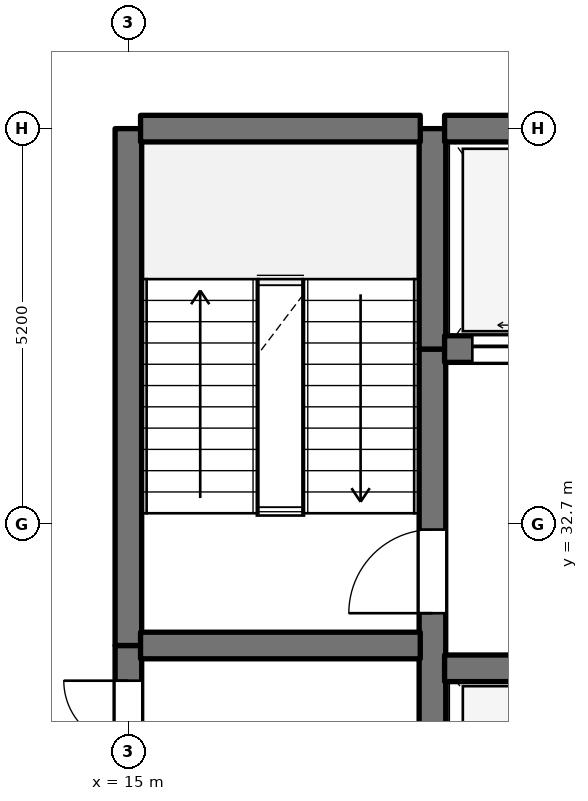
"""IFC4 building model, lengths in metres.
Left out: names, types, materials, properties, quantities, classifications, styles, units other than length and angle.
Written with IfcOpenShell. Run it as: python <this file> out.ifc"""

import sys

from ifc_helpers import new_model, si_unit, direction, frame, frame_2d, origin, place, context, subcontext, project, spatial, rectangle, extrude, element, fill, save


model = new_model("IFC4")
c1 = context("Model", 3, precision=1e-05, world=origin(), true_north=direction((0.0, 1.0)))
c2 = subcontext(c1, "Body", "Model", "MODEL_VIEW")
j1 = project(units=[si_unit("LENGTHUNIT", "METRE"), si_unit("PLANEANGLEUNIT", "RADIAN")], contexts=[c1])
p1 = place(None, origin())
s1 = spatial("IfcSite", under=j1, at=p1, CompositionType="ELEMENT")
p2 = place(p1, origin())
s2 = spatial("IfcBuilding", under=s1, at=p2, CompositionType="ELEMENT")
p3 = place(p2, frame((0.0, 0.0, 164.6)))
s3 = spatial("IfcBuildingStorey", under=s2, at=p3, CompositionType="ELEMENT", Elevation=164.6)
p4 = place(p3, frame((15.0, 29.5, 0.0), z_axis=(0.0, 0.0, 1.0), x_axis=(0.0, 1.0, 0.0)))
e1 = element("IfcWall", 1, at=p4, inside=s3, PredefinedType="SHEAR", context=c2, shape_type="SweptSolid", body=[
    extrude(rectangle(XDim=1.6, YDim=0.35, at=frame_2d((0.8, 0.0))), origin(), (0.0, 0.0, 1.0), 4.19),
])
p5 = place(p4, frame((0.287, 0.0, 0.0)))
e2 = element("IfcOpeningElement", 2, at=p5, cuts=e1, PredefinedType="OPENING", context=c2, shape_type="SweptSolid", body=[
    extrude(rectangle(XDim=0.85, YDim=2.1, at=frame_2d((0.425, 1.05))), frame((0.0, 0.185, 0.0), z_axis=(0.0, -1.0, 0.0), x_axis=(1.0, 0.0, 0.0)), (0.0, 0.0, 1.0), 0.37),
])
p6 = place(p3, frame((15.0, 31.1, 0.0), z_axis=(0.0, 0.0, 1.0), x_axis=(0.0, 1.0, 0.0)))
e3 = element("IfcWall", 3, at=p6, inside=s3, PredefinedType="SHEAR", context=c2, shape_type="SweptSolid", body=[
    extrude(rectangle(XDim=6.8, YDim=0.35, at=frame_2d((3.4, 0.0))), origin(), (0.0, 0.0, 1.0), 4.19),
])
p7 = place(p3, frame((19.0, 29.5, 0.0), z_axis=(0.0, 0.0, 1.0), x_axis=(0.0, 1.0, 0.0)))
e4 = element("IfcWall", 4, at=p7, inside=s3, PredefinedType="SHEAR", context=c2, shape_type="SweptSolid", body=[
    extrude(rectangle(XDim=5.5, YDim=0.35, at=frame_2d((2.75, 0.0))), origin(), (0.0, 0.0, 1.0), 4.19),
])
p8 = place(p7, frame((2.025, 0.0, 0.0)))
e5 = element("IfcOpeningElement", 5, at=p8, cuts=e4, PredefinedType="OPENING", context=c2, shape_type="SweptSolid", body=[
    extrude(rectangle(XDim=1.1, YDim=2.15, at=frame_2d((0.55, 1.075))), frame((0.0, 0.185, 0.0), z_axis=(0.0, -1.0, 0.0), x_axis=(1.0, 0.0, 0.0)), (0.0, 0.0, 1.0), 0.37),
])
p9 = place(p3, frame((19.0, 35.0, 0.0), z_axis=(0.0, 0.0, 1.0), x_axis=(0.0, 1.0, 0.0)))
e6 = element("IfcWall", 6, at=p9, inside=s3, PredefinedType="SHEAR", context=c2, shape_type="SweptSolid", body=[
    extrude(rectangle(XDim=2.9, YDim=0.35, at=frame_2d((1.45, 0.0))), origin(), (0.0, 0.0, 1.0), 4.19),
])
p10 = place(p3, frame((19.16, 30.8, 0.0), z_axis=(0.0, 0.0, 1.0), x_axis=(1.0, 0.0, 0.0)))
e7 = element("IfcWall", 7, at=p10, inside=s3, PredefinedType="SHEAR", context=c2, shape_type="SweptSolid", body=[
    extrude(rectangle(XDim=4.48, YDim=0.35, at=frame_2d((2.24, 0.0))), origin(), (0.0, 0.0, 1.0), 4.19),
])
p11 = place(p3, frame((15.16, 31.1, 0.0), z_axis=(0.0, 0.0, 1.0), x_axis=(1.0, 0.0, 0.0)))
e8 = element("IfcWall", 8, at=p11, inside=s3, PredefinedType="SHEAR", context=c2, shape_type="SweptSolid", body=[
    extrude(rectangle(XDim=3.68, YDim=0.35, at=frame_2d((1.84, 0.0))), origin(), (0.0, 0.0, 1.0), 4.19),
])
p12 = place(p3, frame((19.16, 35.0, 0.0), z_axis=(0.0, 0.0, 1.0), x_axis=(1.0, 0.0, 0.0)))
e9 = element("IfcWall", 9, at=p12, inside=s3, PredefinedType="SHEAR", context=c2, shape_type="SweptSolid", body=[
    extrude(rectangle(XDim=4.48, YDim=0.35, at=frame_2d((2.24, 0.0))), origin(), (0.0, 0.0, 1.0), 4.19),
])
p13 = place(p12, frame((0.365, 0.0, 0.0)))
e10 = element("IfcOpeningElement", 10, at=p13, cuts=e9, PredefinedType="OPENING", context=c2, shape_type="SweptSolid", body=[
    extrude(rectangle(XDim=1.35, YDim=2.2, at=frame_2d((0.675, 1.1))), frame((0.0, 0.185, 0.0), z_axis=(0.0, -1.0, 0.0), x_axis=(1.0, 0.0, 0.0)), (0.0, 0.0, 1.0), 0.37),
])
p14 = place(p12, frame((2.765, 0.0, 0.0)))
e11 = element("IfcOpeningElement", 11, at=p14, cuts=e9, PredefinedType="OPENING", context=c2, shape_type="SweptSolid", body=[
    extrude(rectangle(XDim=1.35, YDim=2.2, at=frame_2d((0.675, 1.1))), frame((0.0, 0.185, 0.0), z_axis=(0.0, -1.0, 0.0), x_axis=(1.0, 0.0, 0.0)), (0.0, 0.0, 1.0), 0.37),
])
p15 = place(p3, frame((15.16, 37.9, 0.0), z_axis=(0.0, 0.0, 1.0), x_axis=(1.0, 0.0, 0.0)))
e12 = element("IfcWall", 12, at=p15, inside=s3, PredefinedType="SHEAR", context=c2, shape_type="SweptSolid", body=[
    extrude(rectangle(XDim=3.68, YDim=0.35, at=frame_2d((1.84, 0.0))), origin(), (0.0, 0.0, 1.0), 4.19),
])
p16 = place(p3, frame((19.16, 37.9, 0.0), z_axis=(0.0, 0.0, 1.0), x_axis=(1.0, 0.0, 0.0)))
e13 = element("IfcWall", 13, at=p16, inside=s3, PredefinedType="SHEAR", context=c2, shape_type="SweptSolid", body=[
    extrude(rectangle(XDim=4.48, YDim=0.35, at=frame_2d((2.24, 0.0))), origin(), (0.0, 0.0, 1.0), 4.19),
])
p17 = place(p5, origin())
e14 = element("IfcDoor", 14, at=p17, inside=s3, OperationType="SINGLE_SWING_RIGHT", PredefinedType="DOOR", context=c2, shape_type="SweptSolid", body=[
    extrude(rectangle(XDim=0.85, YDim=2.1, at=frame_2d((0.425, 1.05))), frame((0.0, 0.025, 0.0), z_axis=(0.0, -1.0, 0.0), x_axis=(1.0, 0.0, 0.0)), (0.0, 0.0, 1.0), 0.05),
])
fill(e2, e14)
p18 = place(p8, origin())
e15 = element("IfcDoor", 15, at=p18, inside=s3, OperationType="SINGLE_SWING_LEFT", PredefinedType="DOOR", context=c2, shape_type="SweptSolid", body=[
    extrude(rectangle(XDim=1.1, YDim=2.15, at=frame_2d((0.55, 1.075))), frame((0.0, 0.025, 0.0), z_axis=(0.0, -1.0, 0.0), x_axis=(1.0, 0.0, 0.0)), (0.0, 0.0, 1.0), 0.05),
])
fill(e5, e15)
p19 = place(p13, origin())
e16 = element("IfcDoor", 16, at=p19, inside=s3, OperationType="DOUBLE_DOOR_SLIDING", PredefinedType="DOOR", context=c2, shape_type="SweptSolid", body=[
    extrude(rectangle(XDim=1.35, YDim=2.2, at=frame_2d((0.675, 1.1))), frame((0.0, 0.025, 0.0), z_axis=(0.0, -1.0, 0.0), x_axis=(1.0, 0.0, 0.0)), (0.0, 0.0, 1.0), 0.05),
])
fill(e10, e16)
save(model, sys.argv[1])
